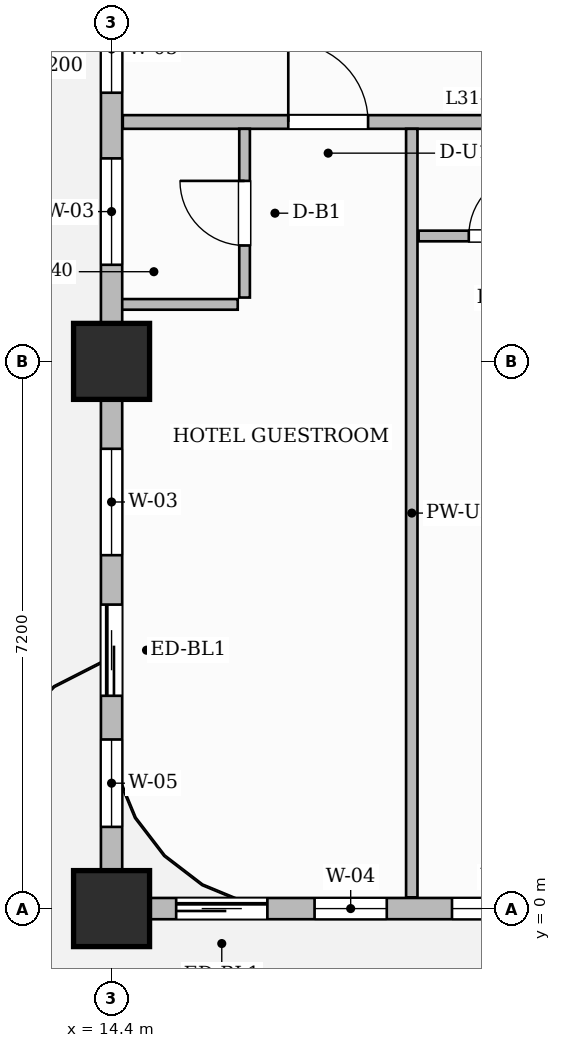
"""IFC4 building model, lengths in metres.
Left out: names, types, materials, properties, quantities, classifications, styles, units other than length and angle.
Written with IfcOpenShell. Run it as: python <this file> out.ifc"""

import sys

from ifc_helpers import new_model, si_unit, direction, frame, frame_2d, origin, origin_2d, place, context, subcontext, project, spatial, rectangle, extrude, source, transform, mapped, element, fill, save


model = new_model("IFC4")
c1 = context("Model", 3, precision=1e-05, world=origin(), true_north=direction((0.0, 1.0)))
c2 = subcontext(c1, "Body", "Model", "MODEL_VIEW")
j1 = project(units=[si_unit("LENGTHUNIT", "METRE"), si_unit("PLANEANGLEUNIT", "RADIAN")], contexts=[c1])
p1 = place(None, origin())
s1 = spatial("IfcSite", under=j1, at=p1, CompositionType="ELEMENT")
p2 = place(p1, origin())
s2 = spatial("IfcBuilding", under=s1, at=p2, CompositionType="ELEMENT")
p3 = place(p2, frame((0.0, 0.0, 126.6)))
s3 = spatial("IfcBuildingStorey", under=s2, at=p3, CompositionType="ELEMENT", Elevation=126.6)
m1 = source(origin(), c2, "Body", "SweptSolid", [
    extrude(rectangle(XDim=1.0, YDim=1.0, at=origin_2d()), origin(), (0.0, 0.0, 1.0), 3.7),
])
for number, where, z_axis, x_axis in (
    (1, (14.4, 0.0, 0.0), (0.0, 0.0, 1.0), (1.0, 0.0, 0.0)),
    (2, (14.4, 7.2, 0.0), (0.0, 0.0, 1.0), (1.0, 0.0, 0.0)),
):
    element("IfcColumn", number, at=place(p3, frame(where, z_axis=z_axis, x_axis=x_axis)), inside=s3, PredefinedType="COLUMN", context=c2, shape_type="MappedRepresentation", body=[
        mapped(m1, transform((0.0, 0.0, 0.0), scale=1.0)),
    ])
p4 = place(p3, frame((14.548, 10.35, 0.0), z_axis=(0.0, 0.0, 1.0), x_axis=(1.0, 0.0, 0.0)))
e3 = element("IfcWall", 3, at=p4, inside=s3, PredefinedType="PARTITIONING", context=c2, shape_type="SweptSolid", body=[
    extrude(rectangle(XDim=15.562, YDim=0.18, at=frame_2d((7.781, 0.0))), origin(), (0.0, 0.0, 1.0), 3.45),
])
p5 = place(p4, frame((2.177, 0.0, 0.0)))
e4 = element("IfcOpeningElement", 4, at=p5, cuts=e3, PredefinedType="OPENING", context=c2, shape_type="SweptSolid", body=[
    extrude(rectangle(XDim=1.05, YDim=2.25, at=frame_2d((0.525, 1.125))), frame((0.0, 0.1, 0.0), z_axis=(0.0, -1.0, 0.0), x_axis=(1.0, 0.0, 0.0)), (0.0, 0.0, 1.0), 0.2),
])
p6 = place(p4, frame((7.162, 0.0, 0.0)))
e5 = element("IfcOpeningElement", 5, at=p6, cuts=e3, PredefinedType="OPENING", context=c2, shape_type="SweptSolid", body=[
    extrude(rectangle(XDim=1.0, YDim=2.2, at=frame_2d((0.5, 1.1))), frame((0.0, 0.1, 0.0), z_axis=(0.0, -1.0, 0.0), x_axis=(1.0, 0.0, 0.0)), (0.0, 0.0, 1.0), 0.2),
])
p7 = place(p4, frame((11.007, 0.0, 0.0)))
e6 = element("IfcOpeningElement", 6, at=p7, cuts=e3, PredefinedType="OPENING", context=c2, shape_type="SweptSolid", body=[
    extrude(rectangle(XDim=1.05, YDim=2.25, at=frame_2d((0.525, 1.125))), frame((0.0, 0.1, 0.0), z_axis=(0.0, -1.0, 0.0), x_axis=(1.0, 0.0, 0.0)), (0.0, 0.0, 1.0), 0.2),
])
p8 = place(p4, frame((14.422, 0.0, 0.0)))
e7 = element("IfcOpeningElement", 7, at=p8, cuts=e3, PredefinedType="OPENING", context=c2, shape_type="SweptSolid", body=[
    extrude(rectangle(XDim=1.0, YDim=2.2, at=frame_2d((0.5, 1.1))), frame((0.0, 0.1, 0.0), z_axis=(0.0, -1.0, 0.0), x_axis=(1.0, 0.0, 0.0)), (0.0, 0.0, 1.0), 0.2),
])
p9 = place(p3, frame((16.15, 8.04, 0.0), z_axis=(0.0, 0.0, 1.0), x_axis=(0.0, 1.0, 0.0)))
e8 = element("IfcWall", 8, at=p9, inside=s3, PredefinedType="PARTITIONING", context=c2, shape_type="SweptSolid", body=[
    extrude(rectangle(XDim=2.22, YDim=0.14, at=frame_2d((1.11, 0.0))), origin(), (0.0, 0.0, 1.0), 3.45),
])
p10 = place(p9, frame((0.685, 0.0, 0.0)))
e9 = element("IfcOpeningElement", 9, at=p10, cuts=e8, PredefinedType="OPENING", context=c2, shape_type="SweptSolid", body=[
    extrude(rectangle(XDim=0.85, YDim=2.1, at=frame_2d((0.425, 1.05))), frame((0.0, 0.08, 0.0), z_axis=(0.0, -1.0, 0.0), x_axis=(1.0, 0.0, 0.0)), (0.0, 0.0, 1.0), 0.16),
])
p11 = place(p3, frame((14.49, 7.95, 0.0), z_axis=(0.0, 0.0, 1.0), x_axis=(1.0, 0.0, 0.0)))
e10 = element("IfcWall", 10, at=p11, inside=s3, PredefinedType="PARTITIONING", context=c2, shape_type="SweptSolid", body=[
    extrude(rectangle(XDim=1.57, YDim=0.14, at=frame_2d((0.785, 0.0))), origin(), (0.0, 0.0, 1.0), 3.45),
])
p12 = place(p3, frame((18.35, 0.148, 0.0), z_axis=(0.0, 0.0, 1.0), x_axis=(0.0, 1.0, 0.0)))
e11 = element("IfcWall", 11, at=p12, inside=s3, PredefinedType="PARTITIONING", context=c2, shape_type="SweptSolid", body=[
    extrude(rectangle(XDim=10.112, YDim=0.15, at=frame_2d((5.056, 0.0))), origin(), (0.0, 0.0, 1.0), 3.45),
])
p13 = place(p3, frame((18.44, 8.85, 0.0), z_axis=(0.0, 0.0, 1.0), x_axis=(1.0, 0.0, 0.0)))
e12 = element("IfcWall", 12, at=p13, inside=s3, PredefinedType="PARTITIONING", context=c2, shape_type="SweptSolid", body=[
    extrude(rectangle(XDim=2.17, YDim=0.14, at=frame_2d((1.085, 0.0))), origin(), (0.0, 0.0, 1.0), 3.45),
])
p14 = place(p13, frame((0.66, 0.0, 0.0)))
e13 = element("IfcOpeningElement", 13, at=p14, cuts=e12, PredefinedType="OPENING", context=c2, shape_type="SweptSolid", body=[
    extrude(rectangle(XDim=0.85, YDim=2.1, at=frame_2d((0.425, 1.05))), frame((0.0, 0.08, 0.0), z_axis=(0.0, -1.0, 0.0), x_axis=(1.0, 0.0, 0.0)), (0.0, 0.0, 1.0), 0.16),
])
p15 = place(p3, frame((14.4, 0.0, 0.0), z_axis=(0.0, 0.0, 1.0), x_axis=(1.0, 0.0, 0.0)))
e14 = element("IfcWall", 14, at=p15, inside=s3, PredefinedType="SOLIDWALL", context=c2, shape_type="SweptSolid", body=[
    extrude(rectangle(XDim=35.4, YDim=0.28, at=frame_2d((17.7, 0.0))), origin(), (0.0, 0.0, 1.0), 2.935),
])
p16 = place(p15, frame((0.85, 0.0, 0.0)))
e15 = element("IfcOpeningElement", 15, at=p16, cuts=e14, PredefinedType="OPENING", context=c2, shape_type="SweptSolid", body=[
    extrude(rectangle(XDim=1.2, YDim=2.2, at=frame_2d((0.6, 1.1))), frame((0.0, 0.15, 0.0), z_axis=(0.0, -1.0, 0.0), x_axis=(1.0, 0.0, 0.0)), (0.0, 0.0, 1.0), 0.3),
])
p17 = place(p15, frame((2.671, 0.0, 0.8)))
e16 = element("IfcOpeningElement", 16, at=p17, cuts=e14, PredefinedType="OPENING", context=c2, shape_type="SweptSolid", body=[
    extrude(rectangle(XDim=0.95, YDim=1.75, at=frame_2d((0.475, 0.875))), frame((0.0, 0.15, 0.0), z_axis=(0.0, -1.0, 0.0), x_axis=(1.0, 0.0, 0.0)), (0.0, 0.0, 1.0), 0.3),
])
p18 = place(p15, frame((4.479, 0.0, 0.8)))
e17 = element("IfcOpeningElement", 17, at=p18, cuts=e14, PredefinedType="OPENING", context=c2, shape_type="SweptSolid", body=[
    extrude(rectangle(XDim=1.4, YDim=1.85, at=frame_2d((0.7, 0.925))), frame((0.0, 0.15, 0.0), z_axis=(0.0, -1.0, 0.0), x_axis=(1.0, 0.0, 0.0)), (0.0, 0.0, 1.0), 0.3),
])
p19 = place(p15, frame((8.181, 0.0, 0.8)))
e18 = element("IfcOpeningElement", 18, at=p19, cuts=e14, PredefinedType="OPENING", context=c2, shape_type="SweptSolid", body=[
    extrude(rectangle(XDim=0.95, YDim=1.75, at=frame_2d((0.475, 0.875))), frame((0.0, 0.15, 0.0), z_axis=(0.0, -1.0, 0.0), x_axis=(1.0, 0.0, 0.0)), (0.0, 0.0, 1.0), 0.3),
])
p20 = place(p15, frame((9.845, 0.0, 0.8)))
e19 = element("IfcOpeningElement", 19, at=p20, cuts=e14, PredefinedType="OPENING", context=c2, shape_type="SweptSolid", body=[
    extrude(rectangle(XDim=1.8, YDim=1.85, at=frame_2d((0.9, 0.925))), frame((0.0, 0.15, 0.0), z_axis=(0.0, -1.0, 0.0), x_axis=(1.0, 0.0, 0.0)), (0.0, 0.0, 1.0), 0.3),
])
p21 = place(p15, frame((12.414, 0.0, 0.8)))
e20 = element("IfcOpeningElement", 20, at=p21, cuts=e14, PredefinedType="OPENING", context=c2, shape_type="SweptSolid", body=[
    extrude(rectangle(XDim=0.95, YDim=1.75, at=frame_2d((0.475, 0.875))), frame((0.0, 0.15, 0.0), z_axis=(0.0, -1.0, 0.0), x_axis=(1.0, 0.0, 0.0)), (0.0, 0.0, 1.0), 0.3),
])
p22 = place(p15, frame((16.804, 0.0, 0.8)))
e21 = element("IfcOpeningElement", 21, at=p22, cuts=e14, PredefinedType="OPENING", context=c2, shape_type="SweptSolid", body=[
    extrude(rectangle(XDim=1.8, YDim=1.85, at=frame_2d((0.9, 0.925))), frame((0.0, 0.15, 0.0), z_axis=(0.0, -1.0, 0.0), x_axis=(1.0, 0.0, 0.0)), (0.0, 0.0, 1.0), 0.3),
])
p23 = place(p15, frame((21.725, 0.0, 0.8)))
e22 = element("IfcOpeningElement", 22, at=p23, cuts=e14, PredefinedType="OPENING", context=c2, shape_type="SweptSolid", body=[
    extrude(rectangle(XDim=1.8, YDim=1.85, at=frame_2d((0.9, 0.925))), frame((0.0, 0.15, 0.0), z_axis=(0.0, -1.0, 0.0), x_axis=(1.0, 0.0, 0.0)), (0.0, 0.0, 1.0), 0.3),
])
p24 = place(p15, frame((24.475, 0.0, 0.8)))
e23 = element("IfcOpeningElement", 23, at=p24, cuts=e14, PredefinedType="OPENING", context=c2, shape_type="SweptSolid", body=[
    extrude(rectangle(XDim=1.8, YDim=1.85, at=frame_2d((0.9, 0.925))), frame((0.0, 0.15, 0.0), z_axis=(0.0, -1.0, 0.0), x_axis=(1.0, 0.0, 0.0)), (0.0, 0.0, 1.0), 0.3),
])
p25 = place(p15, frame((29.075, 0.0, 0.8)))
e24 = element("IfcOpeningElement", 24, at=p25, cuts=e14, PredefinedType="OPENING", context=c2, shape_type="SweptSolid", body=[
    extrude(rectangle(XDim=1.8, YDim=1.85, at=frame_2d((0.9, 0.925))), frame((0.0, 0.15, 0.0), z_axis=(0.0, -1.0, 0.0), x_axis=(1.0, 0.0, 0.0)), (0.0, 0.0, 1.0), 0.3),
])
p26 = place(p15, frame((32.125, 0.0, 0.8)))
e25 = element("IfcOpeningElement", 25, at=p26, cuts=e14, PredefinedType="OPENING", context=c2, shape_type="SweptSolid", body=[
    extrude(rectangle(XDim=1.8, YDim=1.85, at=frame_2d((0.9, 0.925))), frame((0.0, 0.15, 0.0), z_axis=(0.0, -1.0, 0.0), x_axis=(1.0, 0.0, 0.0)), (0.0, 0.0, 1.0), 0.3),
])
p27 = place(p3, frame((14.4, 0.05, 0.0), z_axis=(0.0, 0.0, 1.0), x_axis=(0.0, 1.0, 0.0)))
e26 = element("IfcWall", 26, at=p27, inside=s3, PredefinedType="SOLIDWALL", context=c2, shape_type="SweptSolid", body=[
    extrude(rectangle(XDim=20.6, YDim=0.28, at=frame_2d((10.3, 0.0))), origin(), (0.0, 0.0, 1.0), 2.935),
])
p28 = place(p27, frame((2.75, 0.0, 0.0)))
e27 = element("IfcOpeningElement", 27, at=p28, cuts=e26, PredefinedType="OPENING", context=c2, shape_type="SweptSolid", body=[
    extrude(rectangle(XDim=1.2, YDim=2.2, at=frame_2d((0.6, 1.1))), frame((0.0, 0.15, 0.0), z_axis=(0.0, -1.0, 0.0), x_axis=(1.0, 0.0, 0.0)), (0.0, 0.0, 1.0), 0.3),
])
p29 = place(p27, frame((1.025, 0.0, 0.8)))
e28 = element("IfcOpeningElement", 28, at=p29, cuts=e26, PredefinedType="OPENING", context=c2, shape_type="SweptSolid", body=[
    extrude(rectangle(XDim=1.15, YDim=1.8, at=frame_2d((0.575, 0.9))), frame((0.0, 0.15, 0.0), z_axis=(0.0, -1.0, 0.0), x_axis=(1.0, 0.0, 0.0)), (0.0, 0.0, 1.0), 0.3),
])
p30 = place(p27, frame((4.6, 0.0, 0.8)))
e29 = element("IfcOpeningElement", 29, at=p30, cuts=e26, PredefinedType="OPENING", context=c2, shape_type="SweptSolid", body=[
    extrude(rectangle(XDim=1.4, YDim=1.85, at=frame_2d((0.7, 0.925))), frame((0.0, 0.15, 0.0), z_axis=(0.0, -1.0, 0.0), x_axis=(1.0, 0.0, 0.0)), (0.0, 0.0, 1.0), 0.3),
])
p31 = place(p27, frame((8.421, 0.0, 0.8)))
e30 = element("IfcOpeningElement", 30, at=p31, cuts=e26, PredefinedType="OPENING", context=c2, shape_type="SweptSolid", body=[
    extrude(rectangle(XDim=1.4, YDim=1.85, at=frame_2d((0.7, 0.925))), frame((0.0, 0.15, 0.0), z_axis=(0.0, -1.0, 0.0), x_axis=(1.0, 0.0, 0.0)), (0.0, 0.0, 1.0), 0.3),
])
p32 = place(p27, frame((10.685, 0.0, 0.8)))
e31 = element("IfcOpeningElement", 31, at=p32, cuts=e26, PredefinedType="OPENING", context=c2, shape_type="SweptSolid", body=[
    extrude(rectangle(XDim=1.15, YDim=1.8, at=frame_2d((0.575, 0.9))), frame((0.0, 0.15, 0.0), z_axis=(0.0, -1.0, 0.0), x_axis=(1.0, 0.0, 0.0)), (0.0, 0.0, 1.0), 0.3),
])
p33 = place(p27, frame((12.414, 0.0, 0.8)))
e32 = element("IfcOpeningElement", 32, at=p33, cuts=e26, PredefinedType="OPENING", context=c2, shape_type="SweptSolid", body=[
    extrude(rectangle(XDim=0.95, YDim=1.75, at=frame_2d((0.475, 0.875))), frame((0.0, 0.15, 0.0), z_axis=(0.0, -1.0, 0.0), x_axis=(1.0, 0.0, 0.0)), (0.0, 0.0, 1.0), 0.3),
])
p34 = place(p27, frame((16.79, 0.0, 0.8)))
e33 = element("IfcOpeningElement", 33, at=p34, cuts=e26, PredefinedType="OPENING", context=c2, shape_type="SweptSolid", body=[
    extrude(rectangle(XDim=1.8, YDim=1.85, at=frame_2d((0.9, 0.925))), frame((0.0, 0.15, 0.0), z_axis=(0.0, -1.0, 0.0), x_axis=(1.0, 0.0, 0.0)), (0.0, 0.0, 1.0), 0.3),
])
m2 = source(origin(), c2, "Body", "SweptSolid", [
    extrude(rectangle(XDim=0.85, YDim=2.1, at=frame_2d((0.425, 1.05))), frame((0.0, 0.025, 0.0), z_axis=(0.0, -1.0, 0.0), x_axis=(1.0, 0.0, 0.0)), (0.0, 0.0, 1.0), 0.05),
])
p35 = place(p10, origin())
e34 = element("IfcDoor", 34, at=p35, inside=s3, OperationType="SINGLE_SWING_RIGHT", PredefinedType="DOOR", context=c2, shape_type="MappedRepresentation", body=[
    mapped(m2, transform((0.0, 0.0, 0.0), scale=1.0)),
])
fill(e9, e34)
m3 = source(origin(), c2, "Body", "SweptSolid", [
    extrude(rectangle(XDim=1.05, YDim=2.25, at=frame_2d((0.525, 1.125))), frame((0.0, 0.025, 0.0), z_axis=(0.0, -1.0, 0.0), x_axis=(1.0, 0.0, 0.0)), (0.0, 0.0, 1.0), 0.05),
])
p36 = place(p5, origin())
e35 = element("IfcDoor", 35, at=p36, inside=s3, OperationType="SINGLE_SWING_LEFT", PredefinedType="DOOR", context=c2, shape_type="MappedRepresentation", body=[
    mapped(m3, transform((0.0, 0.0, 0.0), scale=1.0)),
])
fill(e4, e35)
p37 = place(p14, origin())
e36 = element("IfcDoor", 36, at=p37, inside=s3, OperationType="SINGLE_SWING_RIGHT", PredefinedType="DOOR", context=c2, shape_type="MappedRepresentation", body=[
    mapped(m2, transform((0.0, 0.0, 0.0), scale=1.0)),
])
fill(e13, e36)
m4 = source(origin(), c2, "Body", "SweptSolid", [
    extrude(rectangle(XDim=1.2, YDim=2.2, at=frame_2d((0.6, 1.1))), frame((0.0, 0.025, 0.0), z_axis=(0.0, -1.0, 0.0), x_axis=(1.0, 0.0, 0.0)), (0.0, 0.0, 1.0), 0.05),
])
p38 = place(p16, origin())
e37 = element("IfcDoor", 37, at=p38, inside=s3, OperationType="SLIDING_TO_LEFT", PredefinedType="DOOR", context=c2, shape_type="MappedRepresentation", body=[
    mapped(m4, transform((0.0, 0.0, 0.0), scale=1.0)),
])
fill(e15, e37)
p39 = place(p28, origin())
e38 = element("IfcDoor", 38, at=p39, inside=s3, OperationType="SLIDING_TO_LEFT", PredefinedType="DOOR", context=c2, shape_type="MappedRepresentation", body=[
    mapped(m4, transform((0.0, 0.0, 0.0), scale=1.0)),
])
fill(e27, e38)
m5 = source(origin(), c2, "Body", "SweptSolid", [
    extrude(rectangle(XDim=0.95, YDim=1.75, at=frame_2d((0.475, 0.875))), frame((0.0, 0.03, 0.0), z_axis=(0.0, -1.0, 0.0), x_axis=(1.0, 0.0, 0.0)), (0.0, 0.0, 1.0), 0.06),
])
p40 = place(p17, origin())
e39 = element("IfcWindow", 39, at=p40, inside=s3, PartitioningType="SINGLE_PANEL", PredefinedType="WINDOW", context=c2, shape_type="MappedRepresentation", body=[
    mapped(m5, transform((0.0, 0.0, 0.0), scale=1.0)),
])
fill(e16, e39)
m6 = source(origin(), c2, "Body", "SweptSolid", [
    extrude(rectangle(XDim=1.4, YDim=1.85, at=frame_2d((0.7, 0.925))), frame((0.0, 0.03, 0.0), z_axis=(0.0, -1.0, 0.0), x_axis=(1.0, 0.0, 0.0)), (0.0, 0.0, 1.0), 0.06),
])
p41 = place(p18, origin())
e40 = element("IfcWindow", 40, at=p41, inside=s3, PartitioningType="SINGLE_PANEL", PredefinedType="WINDOW", context=c2, shape_type="MappedRepresentation", body=[
    mapped(m6, transform((0.0, 0.0, 0.0), scale=1.0)),
])
fill(e17, e40)
m7 = source(origin(), c2, "Body", "SweptSolid", [
    extrude(rectangle(XDim=1.15, YDim=1.8, at=frame_2d((0.575, 0.9))), frame((0.0, 0.03, 0.0), z_axis=(0.0, -1.0, 0.0), x_axis=(1.0, 0.0, 0.0)), (0.0, 0.0, 1.0), 0.06),
])
p42 = place(p29, origin())
e41 = element("IfcWindow", 41, at=p42, inside=s3, PartitioningType="SINGLE_PANEL", PredefinedType="WINDOW", context=c2, shape_type="MappedRepresentation", body=[
    mapped(m7, transform((0.0, 0.0, 0.0), scale=1.0)),
])
fill(e28, e41)
p43 = place(p30, origin())
e42 = element("IfcWindow", 42, at=p43, inside=s3, PartitioningType="SINGLE_PANEL", PredefinedType="WINDOW", context=c2, shape_type="MappedRepresentation", body=[
    mapped(m6, transform((0.0, 0.0, 0.0), scale=1.0)),
])
fill(e29, e42)
p44 = place(p31, origin())
e43 = element("IfcWindow", 43, at=p44, inside=s3, PartitioningType="SINGLE_PANEL", PredefinedType="WINDOW", context=c2, shape_type="MappedRepresentation", body=[
    mapped(m6, transform((0.0, 0.0, 0.0), scale=1.0)),
])
fill(e30, e43)
p45 = place(p32, origin())
e44 = element("IfcWindow", 44, at=p45, inside=s3, PartitioningType="SINGLE_PANEL", PredefinedType="WINDOW", context=c2, shape_type="MappedRepresentation", body=[
    mapped(m7, transform((0.0, 0.0, 0.0), scale=1.0)),
])
fill(e31, e44)
save(model, sys.argv[1])
